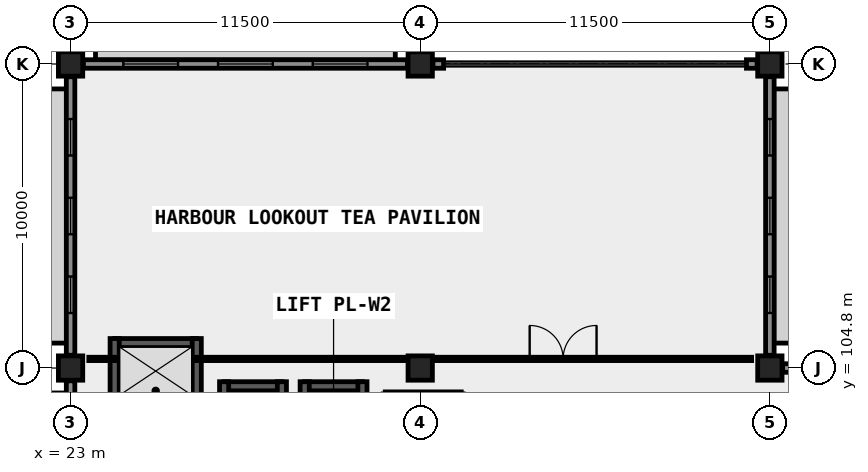
"""IFC4 building model, lengths in metres.
Left out: names, types, materials, properties, quantities, classifications, styles, units other than length and angle.
Written with IfcOpenShell. Run it as: python <this file> out.ifc"""

import sys

from ifc_helpers import new_model, si_unit, direction, frame, frame_2d, origin, origin_2d, place, context, subcontext, project, spatial, rectangle, extrude, element, fill, save


model = new_model("IFC4")
c1 = context("Model", 3, precision=1e-05, world=origin(), true_north=direction((0.0, 1.0)))
c2 = subcontext(c1, "Body", "Model", "MODEL_VIEW")
j1 = project(units=[si_unit("LENGTHUNIT", "METRE"), si_unit("PLANEANGLEUNIT", "RADIAN")], contexts=[c1])
p1 = place(None, origin())
s1 = spatial("IfcSite", under=j1, at=p1, CompositionType="ELEMENT")
p2 = place(p1, origin())
s2 = spatial("IfcBuilding", under=s1, at=p2, CompositionType="ELEMENT")
p3 = place(p2, frame((0.0, 0.0, 18.3)))
s3 = spatial("IfcBuildingStorey", under=s2, at=p3, CompositionType="ELEMENT", Elevation=18.3)
for number, where, z_axis, x_axis in (
    (1, (23.0, 104.8, 0.0), (0.0, 0.0, 1.0), (1.0, 0.0, 0.0)),
    (2, (23.0, 114.8, 0.0), (0.0, 0.0, 1.0), (1.0, 0.0, 0.0)),
    (3, (34.5, 104.8, 0.0), (0.0, 0.0, 1.0), (1.0, 0.0, 0.0)),
    (4, (34.5, 114.8, 0.0), (0.0, 0.0, 1.0), (1.0, 0.0, 0.0)),
    (5, (46.0, 104.8, 0.0), (0.0, 0.0, 1.0), (1.0, 0.0, 0.0)),
    (6, (46.0, 114.8, 0.0), (0.0, 0.0, 1.0), (1.0, 0.0, 0.0)),
):
    element("IfcColumn", number, at=place(p3, frame(where, z_axis=z_axis, x_axis=x_axis)), inside=s3, PredefinedType="COLUMN", context=c2, shape_type="SweptSolid", body=[
        extrude(rectangle(XDim=0.8, YDim=0.8, at=origin_2d()), origin(), (0.0, 0.0, 1.0), 4.16),
    ])
p4 = place(p3, frame((24.45, 105.62, 0.0), z_axis=(0.0, 0.0, 1.0), x_axis=(1.0, 0.0, 0.0)))
e7 = element("IfcWall", 7, at=p4, inside=s3, PredefinedType="SHEAR", context=c2, shape_type="SweptSolid", body=[
    extrude(rectangle(XDim=2.7, YDim=0.3, at=frame_2d((1.35, 0.0))), origin(), (0.0, 0.0, 1.0), 4.0),
])
for number, where, z_axis, x_axis in (
    (8, (24.45, 103.63, 0.0), (0.0, 0.0, 1.0), (0.0, 1.0, 0.0)),
    (9, (27.15, 103.63, 0.0), (0.0, 0.0, 1.0), (0.0, 1.0, 0.0)),
):
    element("IfcWall", number, at=place(p3, frame(where, z_axis=z_axis, x_axis=x_axis)), inside=s3, PredefinedType="SHEAR", context=c2, shape_type="SweptSolid", body=[
        extrude(rectangle(XDim=2.14, YDim=0.3, at=frame_2d((1.07, 0.0))), origin(), (0.0, 0.0, 1.0), 4.0),
    ])
p5 = place(p3, frame((28.05, 104.2, 0.0), z_axis=(0.0, 0.0, 1.0), x_axis=(1.0, 0.0, 0.0)))
e10 = element("IfcWall", 10, at=p5, inside=s3, PredefinedType="SHEAR", context=c2, shape_type="SweptSolid", body=[
    extrude(rectangle(XDim=1.9, YDim=0.3, at=frame_2d((0.95, 0.0))), origin(), (0.0, 0.0, 1.0), 4.0),
])
for number, where, z_axis, x_axis in (
    (11, (28.05, 101.35, 0.0), (0.0, 0.0, 1.0), (0.0, 1.0, 0.0)),
    (12, (29.95, 101.35, 0.0), (0.0, 0.0, 1.0), (0.0, 1.0, 0.0)),
):
    element("IfcWall", number, at=place(p3, frame(where, z_axis=z_axis, x_axis=x_axis)), inside=s3, PredefinedType="SHEAR", context=c2, shape_type="SweptSolid", body=[
        extrude(rectangle(XDim=3.0, YDim=0.3, at=frame_2d((1.5, 0.0))), origin(), (0.0, 0.0, 1.0), 4.0),
    ])
p6 = place(p3, frame((30.7, 104.2, 0.0), z_axis=(0.0, 0.0, 1.0), x_axis=(1.0, 0.0, 0.0)))
e13 = element("IfcWall", 13, at=p6, inside=s3, PredefinedType="SHEAR", context=c2, shape_type="SweptSolid", body=[
    extrude(rectangle(XDim=1.9, YDim=0.3, at=frame_2d((0.95, 0.0))), origin(), (0.0, 0.0, 1.0), 4.0),
])
for number, where, z_axis, x_axis in (
    (14, (30.7, 101.35, 0.0), (0.0, 0.0, 1.0), (0.0, 1.0, 0.0)),
    (15, (32.6, 101.35, 0.0), (0.0, 0.0, 1.0), (0.0, 1.0, 0.0)),
):
    element("IfcWall", number, at=place(p3, frame(where, z_axis=z_axis, x_axis=x_axis)), inside=s3, PredefinedType="SHEAR", context=c2, shape_type="SweptSolid", body=[
        extrude(rectangle(XDim=3.0, YDim=0.3, at=frame_2d((1.5, 0.0))), origin(), (0.0, 0.0, 1.0), 4.0),
    ])
p7 = place(p3, frame((46.42, 104.8, 0.0), z_axis=(0.0, 0.0, 1.0), x_axis=(1.0, 0.0, 0.0)))
e16 = element("IfcWall", 16, at=p7, inside=s3, PredefinedType="SOLIDWALL", context=c2, shape_type="SweptSolid", body=[
    extrude(rectangle(XDim=10.66, YDim=0.28, at=frame_2d((5.33, 0.0))), origin(), (0.0, 0.0, 1.0), 3.1),
])
p8 = place(p7, frame((1.765, 0.0, 0.8)))
e17 = element("IfcOpeningElement", 17, at=p8, cuts=e16, PredefinedType="OPENING", context=c2, shape_type="SweptSolid", body=[
    extrude(rectangle(XDim=1.2, YDim=2.1, at=frame_2d((0.6, 1.05))), frame((0.0, 0.15, 0.0), z_axis=(0.0, -1.0, 0.0), x_axis=(1.0, 0.0, 0.0)), (0.0, 0.0, 1.0), 0.3),
])
p9 = place(p7, frame((4.73, 0.0, 0.8)))
e18 = element("IfcOpeningElement", 18, at=p9, cuts=e16, PredefinedType="OPENING", context=c2, shape_type="SweptSolid", body=[
    extrude(rectangle(XDim=1.2, YDim=2.1, at=frame_2d((0.6, 1.05))), frame((0.0, 0.15, 0.0), z_axis=(0.0, -1.0, 0.0), x_axis=(1.0, 0.0, 0.0)), (0.0, 0.0, 1.0), 0.3),
])
p10 = place(p7, frame((7.695, 0.0, 0.8)))
e19 = element("IfcOpeningElement", 19, at=p10, cuts=e16, PredefinedType="OPENING", context=c2, shape_type="SweptSolid", body=[
    extrude(rectangle(XDim=1.2, YDim=2.1, at=frame_2d((0.6, 1.05))), frame((0.0, 0.15, 0.0), z_axis=(0.0, -1.0, 0.0), x_axis=(1.0, 0.0, 0.0)), (0.0, 0.0, 1.0), 0.3),
])
p11 = place(p3, frame((46.0, 105.22, 0.0), z_axis=(0.0, 0.0, 1.0), x_axis=(0.0, 1.0, 0.0)))
e20 = element("IfcWall", 20, at=p11, inside=s3, PredefinedType="SOLIDWALL", context=c2, shape_type="SweptSolid", body=[
    extrude(rectangle(XDim=9.16, YDim=0.28, at=frame_2d((4.58, 0.0))), origin(), (0.0, 0.0, 1.0), 3.1),
])
p12 = place(p11, frame((1.39, 0.0, 0.8)))
e21 = element("IfcOpeningElement", 21, at=p12, cuts=e20, PredefinedType="OPENING", context=c2, shape_type="SweptSolid", body=[
    extrude(rectangle(XDim=1.2, YDim=2.1, at=frame_2d((0.6, 1.05))), frame((0.0, 0.15, 0.0), z_axis=(0.0, -1.0, 0.0), x_axis=(1.0, 0.0, 0.0)), (0.0, 0.0, 1.0), 0.3),
])
p13 = place(p11, frame((3.98, 0.0, 0.8)))
e22 = element("IfcOpeningElement", 22, at=p13, cuts=e20, PredefinedType="OPENING", context=c2, shape_type="SweptSolid", body=[
    extrude(rectangle(XDim=1.2, YDim=2.1, at=frame_2d((0.6, 1.05))), frame((0.0, 0.15, 0.0), z_axis=(0.0, -1.0, 0.0), x_axis=(1.0, 0.0, 0.0)), (0.0, 0.0, 1.0), 0.3),
])
p14 = place(p11, frame((6.57, 0.0, 0.8)))
e23 = element("IfcOpeningElement", 23, at=p14, cuts=e20, PredefinedType="OPENING", context=c2, shape_type="SweptSolid", body=[
    extrude(rectangle(XDim=1.2, YDim=2.1, at=frame_2d((0.6, 1.05))), frame((0.0, 0.15, 0.0), z_axis=(0.0, -1.0, 0.0), x_axis=(1.0, 0.0, 0.0)), (0.0, 0.0, 1.0), 0.3),
])
p15 = place(p3, frame((23.42, 114.8, 0.0), z_axis=(0.0, 0.0, 1.0), x_axis=(1.0, 0.0, 0.0)))
e24 = element("IfcWall", 24, at=p15, inside=s3, PredefinedType="SOLIDWALL", context=c2, shape_type="SweptSolid", body=[
    extrude(rectangle(XDim=10.66, YDim=0.28, at=frame_2d((5.33, 0.0))), origin(), (0.0, 0.0, 1.0), 3.1),
])
p16 = place(p15, frame((1.315, 0.0, 0.6)))
e25 = element("IfcOpeningElement", 25, at=p16, cuts=e24, PredefinedType="OPENING", context=c2, shape_type="SweptSolid", body=[
    extrude(rectangle(XDim=1.8, YDim=2.3, at=frame_2d((0.9, 1.15))), frame((0.0, 0.15, 0.0), z_axis=(0.0, -1.0, 0.0), x_axis=(1.0, 0.0, 0.0)), (0.0, 0.0, 1.0), 0.3),
])
p17 = place(p15, frame((4.43, 0.0, 0.6)))
e26 = element("IfcOpeningElement", 26, at=p17, cuts=e24, PredefinedType="OPENING", context=c2, shape_type="SweptSolid", body=[
    extrude(rectangle(XDim=1.8, YDim=2.3, at=frame_2d((0.9, 1.15))), frame((0.0, 0.15, 0.0), z_axis=(0.0, -1.0, 0.0), x_axis=(1.0, 0.0, 0.0)), (0.0, 0.0, 1.0), 0.3),
])
p18 = place(p15, frame((7.545, 0.0, 0.6)))
e27 = element("IfcOpeningElement", 27, at=p18, cuts=e24, PredefinedType="OPENING", context=c2, shape_type="SweptSolid", body=[
    extrude(rectangle(XDim=1.8, YDim=2.3, at=frame_2d((0.9, 1.15))), frame((0.0, 0.15, 0.0), z_axis=(0.0, -1.0, 0.0), x_axis=(1.0, 0.0, 0.0)), (0.0, 0.0, 1.0), 0.3),
])
for number, where, z_axis, x_axis in (
    (28, (34.92, 114.8, 0.0), (0.0, 0.0, 1.0), (1.0, 0.0, 0.0)),
    (29, (45.23, 114.8, 0.0), (0.0, 0.0, 1.0), (1.0, 0.0, 0.0)),
):
    element("IfcWall", number, at=place(p3, frame(where, z_axis=z_axis, x_axis=x_axis)), inside=s3, PredefinedType="SOLIDWALL", context=c2, shape_type="SweptSolid", body=[
        extrude(rectangle(XDim=0.35, YDim=0.28, at=frame_2d((0.175, 0.0))), origin(), (0.0, 0.0, 1.0), 3.89),
    ])
p19 = place(p3, frame((23.0, 95.22, 0.0), z_axis=(0.0, 0.0, 1.0), x_axis=(0.0, 1.0, 0.0)))
e30 = element("IfcWall", 30, at=p19, inside=s3, PredefinedType="SOLIDWALL", context=c2, shape_type="SweptSolid", body=[
    extrude(rectangle(XDim=9.16, YDim=0.28, at=frame_2d((4.58, 0.0))), origin(), (0.0, 0.0, 1.0), 3.1),
])
p20 = place(p19, frame((1.39, 0.0, 0.8)))
e31 = element("IfcOpeningElement", 31, at=p20, cuts=e30, PredefinedType="OPENING", context=c2, shape_type="SweptSolid", body=[
    extrude(rectangle(XDim=1.2, YDim=2.1, at=frame_2d((0.6, 1.05))), frame((0.0, 0.15, 0.0), z_axis=(0.0, -1.0, 0.0), x_axis=(1.0, 0.0, 0.0)), (0.0, 0.0, 1.0), 0.3),
])
p21 = place(p19, frame((3.98, 0.0, 0.8)))
e32 = element("IfcOpeningElement", 32, at=p21, cuts=e30, PredefinedType="OPENING", context=c2, shape_type="SweptSolid", body=[
    extrude(rectangle(XDim=1.2, YDim=2.1, at=frame_2d((0.6, 1.05))), frame((0.0, 0.15, 0.0), z_axis=(0.0, -1.0, 0.0), x_axis=(1.0, 0.0, 0.0)), (0.0, 0.0, 1.0), 0.3),
])
p22 = place(p19, frame((6.57, 0.0, 0.8)))
e33 = element("IfcOpeningElement", 33, at=p22, cuts=e30, PredefinedType="OPENING", context=c2, shape_type="SweptSolid", body=[
    extrude(rectangle(XDim=1.2, YDim=2.1, at=frame_2d((0.6, 1.05))), frame((0.0, 0.15, 0.0), z_axis=(0.0, -1.0, 0.0), x_axis=(1.0, 0.0, 0.0)), (0.0, 0.0, 1.0), 0.3),
])
p23 = place(p3, frame((23.0, 105.22, 0.0), z_axis=(0.0, 0.0, 1.0), x_axis=(0.0, 1.0, 0.0)))
e34 = element("IfcWall", 34, at=p23, inside=s3, PredefinedType="SOLIDWALL", context=c2, shape_type="SweptSolid", body=[
    extrude(rectangle(XDim=9.16, YDim=0.28, at=frame_2d((4.58, 0.0))), origin(), (0.0, 0.0, 1.0), 3.1),
])
p24 = place(p23, frame((1.39, 0.0, 0.8)))
e35 = element("IfcOpeningElement", 35, at=p24, cuts=e34, PredefinedType="OPENING", context=c2, shape_type="SweptSolid", body=[
    extrude(rectangle(XDim=1.2, YDim=2.1, at=frame_2d((0.6, 1.05))), frame((0.0, 0.15, 0.0), z_axis=(0.0, -1.0, 0.0), x_axis=(1.0, 0.0, 0.0)), (0.0, 0.0, 1.0), 0.3),
])
p25 = place(p23, frame((3.98, 0.0, 0.8)))
e36 = element("IfcOpeningElement", 36, at=p25, cuts=e34, PredefinedType="OPENING", context=c2, shape_type="SweptSolid", body=[
    extrude(rectangle(XDim=1.2, YDim=2.1, at=frame_2d((0.6, 1.05))), frame((0.0, 0.15, 0.0), z_axis=(0.0, -1.0, 0.0), x_axis=(1.0, 0.0, 0.0)), (0.0, 0.0, 1.0), 0.3),
])
p26 = place(p23, frame((6.57, 0.0, 0.8)))
e37 = element("IfcOpeningElement", 37, at=p26, cuts=e34, PredefinedType="OPENING", context=c2, shape_type="SweptSolid", body=[
    extrude(rectangle(XDim=1.2, YDim=2.1, at=frame_2d((0.6, 1.05))), frame((0.0, 0.15, 0.0), z_axis=(0.0, -1.0, 0.0), x_axis=(1.0, 0.0, 0.0)), (0.0, 0.0, 1.0), 0.3),
])
p27 = place(p3, frame((33.35, 103.95, 0.0), z_axis=(0.0, 0.0, 1.0), x_axis=(1.0, 0.0, 0.0)))
e38 = element("IfcWall", 38, at=p27, inside=s3, PredefinedType="PLUMBINGWALL", context=c2, shape_type="SweptSolid", body=[
    extrude(rectangle(XDim=2.5, YDim=0.13, at=frame_2d((1.25, 0.0))), origin(), (0.0, 0.0, 1.0), 3.88),
])
p28 = place(p3, frame((23.6, 105.1, 0.0), z_axis=(0.0, 0.0, 1.0), x_axis=(1.0, 0.0, 0.0)))
e39 = element("IfcWall", 39, at=p28, inside=s3, PredefinedType="MOVABLE", context=c2, shape_type="SweptSolid", body=[
    extrude(rectangle(XDim=21.8, YDim=0.11, at=frame_2d((10.9, 0.0))), origin(), (0.0, 0.0, 1.0), 3.88),
])
p29 = place(p28, frame((14.5, 0.0, 0.0)))
e40 = element("IfcOpeningElement", 40, at=p29, cuts=e39, PredefinedType="OPENING", context=c2, shape_type="SweptSolid", body=[
    extrude(rectangle(XDim=2.2, YDim=2.4, at=frame_2d((1.1, 1.2))), frame((0.0, 0.065, 0.0), z_axis=(0.0, -1.0, 0.0), x_axis=(1.0, 0.0, 0.0)), (0.0, 0.0, 1.0), 0.13),
])
p30 = place(p12, origin())
e41 = element("IfcWindow", 41, at=p30, inside=s3, PartitioningType="SINGLE_PANEL", PredefinedType="WINDOW", context=c2, shape_type="SweptSolid", body=[
    extrude(rectangle(XDim=1.2, YDim=2.1, at=frame_2d((0.6, 1.05))), frame((0.0, 0.03, 0.0), z_axis=(0.0, -1.0, 0.0), x_axis=(1.0, 0.0, 0.0)), (0.0, 0.0, 1.0), 0.06),
])
fill(e21, e41)
p31 = place(p13, origin())
e42 = element("IfcWindow", 42, at=p31, inside=s3, PartitioningType="SINGLE_PANEL", PredefinedType="WINDOW", context=c2, shape_type="SweptSolid", body=[
    extrude(rectangle(XDim=1.2, YDim=2.1, at=frame_2d((0.6, 1.05))), frame((0.0, 0.03, 0.0), z_axis=(0.0, -1.0, 0.0), x_axis=(1.0, 0.0, 0.0)), (0.0, 0.0, 1.0), 0.06),
])
fill(e22, e42)
p32 = place(p14, origin())
e43 = element("IfcWindow", 43, at=p32, inside=s3, PartitioningType="SINGLE_PANEL", PredefinedType="WINDOW", context=c2, shape_type="SweptSolid", body=[
    extrude(rectangle(XDim=1.2, YDim=2.1, at=frame_2d((0.6, 1.05))), frame((0.0, 0.03, 0.0), z_axis=(0.0, -1.0, 0.0), x_axis=(1.0, 0.0, 0.0)), (0.0, 0.0, 1.0), 0.06),
])
fill(e23, e43)
p33 = place(p16, origin())
e44 = element("IfcWindow", 44, at=p33, inside=s3, PartitioningType="SINGLE_PANEL", PredefinedType="WINDOW", context=c2, shape_type="SweptSolid", body=[
    extrude(rectangle(XDim=1.8, YDim=2.3, at=frame_2d((0.9, 1.15))), frame((0.0, 0.03, 0.0), z_axis=(0.0, -1.0, 0.0), x_axis=(1.0, 0.0, 0.0)), (0.0, 0.0, 1.0), 0.06),
])
fill(e25, e44)
p34 = place(p17, origin())
e45 = element("IfcWindow", 45, at=p34, inside=s3, PartitioningType="SINGLE_PANEL", PredefinedType="WINDOW", context=c2, shape_type="SweptSolid", body=[
    extrude(rectangle(XDim=1.8, YDim=2.3, at=frame_2d((0.9, 1.15))), frame((0.0, 0.03, 0.0), z_axis=(0.0, -1.0, 0.0), x_axis=(1.0, 0.0, 0.0)), (0.0, 0.0, 1.0), 0.06),
])
fill(e26, e45)
p35 = place(p18, origin())
e46 = element("IfcWindow", 46, at=p35, inside=s3, PartitioningType="SINGLE_PANEL", PredefinedType="WINDOW", context=c2, shape_type="SweptSolid", body=[
    extrude(rectangle(XDim=1.8, YDim=2.3, at=frame_2d((0.9, 1.15))), frame((0.0, 0.03, 0.0), z_axis=(0.0, -1.0, 0.0), x_axis=(1.0, 0.0, 0.0)), (0.0, 0.0, 1.0), 0.06),
])
fill(e27, e46)
p36 = place(p24, origin())
e47 = element("IfcWindow", 47, at=p36, inside=s3, PartitioningType="SINGLE_PANEL", PredefinedType="WINDOW", context=c2, shape_type="SweptSolid", body=[
    extrude(rectangle(XDim=1.2, YDim=2.1, at=frame_2d((0.6, 1.05))), frame((0.0, 0.03, 0.0), z_axis=(0.0, -1.0, 0.0), x_axis=(1.0, 0.0, 0.0)), (0.0, 0.0, 1.0), 0.06),
])
fill(e35, e47)
p37 = place(p25, origin())
e48 = element("IfcWindow", 48, at=p37, inside=s3, PartitioningType="SINGLE_PANEL", PredefinedType="WINDOW", context=c2, shape_type="SweptSolid", body=[
    extrude(rectangle(XDim=1.2, YDim=2.1, at=frame_2d((0.6, 1.05))), frame((0.0, 0.03, 0.0), z_axis=(0.0, -1.0, 0.0), x_axis=(1.0, 0.0, 0.0)), (0.0, 0.0, 1.0), 0.06),
])
fill(e36, e48)
p38 = place(p26, origin())
e49 = element("IfcWindow", 49, at=p38, inside=s3, PartitioningType="SINGLE_PANEL", PredefinedType="WINDOW", context=c2, shape_type="SweptSolid", body=[
    extrude(rectangle(XDim=1.2, YDim=2.1, at=frame_2d((0.6, 1.05))), frame((0.0, 0.03, 0.0), z_axis=(0.0, -1.0, 0.0), x_axis=(1.0, 0.0, 0.0)), (0.0, 0.0, 1.0), 0.06),
])
fill(e37, e49)
p39 = place(p29, origin())
e50 = element("IfcDoor", 50, at=p39, inside=s3, OperationType="DOUBLE_DOOR_SINGLE_SWING", PredefinedType="DOOR", context=c2, shape_type="SweptSolid", body=[
    extrude(rectangle(XDim=2.2, YDim=2.4, at=frame_2d((1.1, 1.2))), frame((0.0, 0.025, 0.0), z_axis=(0.0, -1.0, 0.0), x_axis=(1.0, 0.0, 0.0)), (0.0, 0.0, 1.0), 0.05),
])
fill(e40, e50)
save(model, sys.argv[1])
